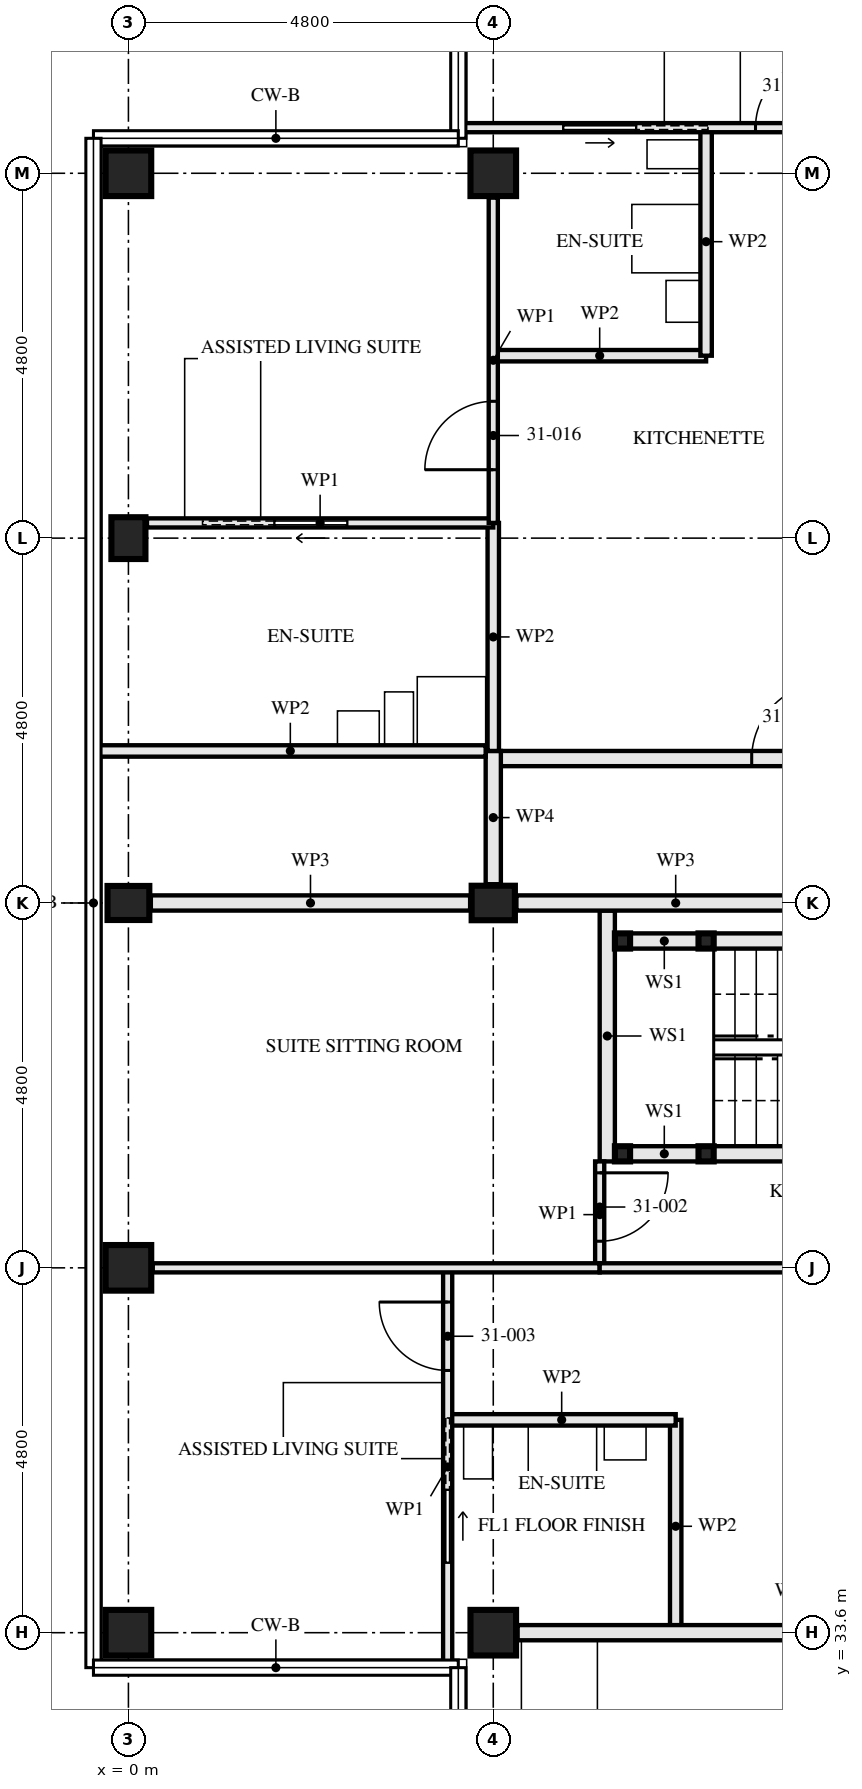
"""IFC4 building model, lengths in metres.
Left out: names, types, materials, properties, quantities, classifications, styles, units other than length and angle.
Written with IfcOpenShell. Run it as: python <this file> out.ifc"""

import sys

from ifc_helpers import new_model, si_unit, direction, frame, frame_2d, origin, origin_2d, place, context, subcontext, project, spatial, rectangle, hollow_rectangle, i_section, extrude, element, fill, save


model = new_model("IFC4")
c1 = context("Model", 3, precision=1e-05, world=origin(), true_north=direction((0.0, 1.0)))
c2 = subcontext(c1, "Body", "Model", "MODEL_VIEW")
j1 = project(units=[si_unit("LENGTHUNIT", "METRE"), si_unit("PLANEANGLEUNIT", "RADIAN")], contexts=[c1])
p1 = place(None, origin())
s1 = spatial("IfcSite", under=j1, at=p1, CompositionType="ELEMENT")
p2 = place(p1, origin())
s2 = spatial("IfcBuilding", under=s1, at=p2, CompositionType="ELEMENT")
p3 = place(p2, frame((0.0, 0.0, 115.5)))
s3 = spatial("IfcBuildingStorey", under=s2, at=p3, CompositionType="ELEMENT", Elevation=115.5)
for number, where, z_axis, x_axis in (
    (1, (0.0, 33.6, 0.0), (0.0, 0.0, 1.0), (0.0, 1.0, 0.0)),
    (2, (0.0, 38.4, 0.0), (0.0, 0.0, 1.0), (1.0, 0.0, 0.0)),
):
    element("IfcColumn", number, at=place(p3, frame(where, z_axis=z_axis, x_axis=x_axis)), inside=s3, PredefinedType="COLUMN", context=c2, shape_type="SweptSolid", body=[
        extrude(hollow_rectangle(XDim=0.6, YDim=0.6, WallThickness=0.08, at=origin_2d()), origin(), (0.0, 0.0, 1.0), 3.5),
    ])
for number, where, z_axis, x_axis in (
    (3, (0.0, 43.2, 0.0), (0.0, 0.0, 1.0), (0.0, 1.0, 0.0)),
    (4, (0.0, 48.0, 0.0), (0.0, 0.0, 1.0), (1.0, 0.0, 0.0)),
):
    element("IfcColumn", number, at=place(p3, frame(where, z_axis=z_axis, x_axis=x_axis)), inside=s3, PredefinedType="COLUMN", context=c2, shape_type="SweptSolid", body=[
        extrude(i_section(OverallWidth=0.448, OverallDepth=0.55, WebThickness=0.072, FlangeThickness=0.115, FilletRadius=0.015, at=origin_2d()), origin(), (0.0, 0.0, 1.0), 3.5),
    ])
p4 = place(p3, frame((0.0, 52.8, 0.0), z_axis=(0.0, 0.0, 1.0), x_axis=(0.0, 1.0, 0.0)))
e5 = element("IfcColumn", 5, at=p4, inside=s3, PredefinedType="COLUMN", context=c2, shape_type="SweptSolid", body=[
    extrude(hollow_rectangle(XDim=0.6, YDim=0.6, WallThickness=0.05, at=origin_2d()), origin(), (0.0, 0.0, 1.0), 3.5),
])
p5 = place(p3, frame((4.8, 33.6, 0.0), z_axis=(0.0, 0.0, 1.0), x_axis=(0.0, 1.0, 0.0)))
e6 = element("IfcColumn", 6, at=p5, inside=s3, PredefinedType="COLUMN", context=c2, shape_type="SweptSolid", body=[
    extrude(hollow_rectangle(XDim=0.6, YDim=0.6, WallThickness=0.08, at=origin_2d()), origin(), (0.0, 0.0, 1.0), 3.5),
])
p6 = place(p3, frame((4.8, 43.2, 0.0), z_axis=(0.0, 0.0, 1.0), x_axis=(0.0, 1.0, 0.0)))
e7 = element("IfcColumn", 7, at=p6, inside=s3, PredefinedType="COLUMN", context=c2, shape_type="SweptSolid", body=[
    extrude(i_section(OverallWidth=0.454, OverallDepth=0.569, WebThickness=0.078, FlangeThickness=0.125, FilletRadius=0.015, at=origin_2d()), origin(), (0.0, 0.0, 1.0), 3.5),
])
p7 = place(p3, frame((4.8, 52.8, 0.0), z_axis=(0.0, 0.0, 1.0), x_axis=(0.0, 1.0, 0.0)))
e8 = element("IfcColumn", 8, at=p7, inside=s3, PredefinedType="COLUMN", context=c2, shape_type="SweptSolid", body=[
    extrude(hollow_rectangle(XDim=0.6, YDim=0.6, WallThickness=0.05, at=origin_2d()), origin(), (0.0, 0.0, 1.0), 3.5),
])
for number, where, z_axis, x_axis in (
    (9, (6.5, 42.7, 0.0), (0.0, 0.0, 1.0), (1.0, 0.0, 0.0)),
    (10, (6.5, 39.9, 0.0), (0.0, 0.0, 1.0), (1.0, 0.0, 0.0)),
    (11, (7.6, 42.7, 0.0), (0.0, 0.0, 1.0), (1.0, 0.0, 0.0)),
    (12, (7.6, 39.9, 0.0), (0.0, 0.0, 1.0), (1.0, 0.0, 0.0)),
):
    element("IfcColumn", number, at=place(p3, frame(where, z_axis=z_axis, x_axis=x_axis)), inside=s3, PredefinedType="COLUMN", context=c2, shape_type="SweptSolid", body=[
        extrude(hollow_rectangle(XDim=0.2, YDim=0.2, WallThickness=0.008, at=origin_2d()), origin(), (0.0, 0.0, 1.0), 3.33),
    ])
p8 = place(p3, frame((6.6, 42.7, 0.0), z_axis=(0.0, 0.0, 1.0), x_axis=(1.0, 0.0, 0.0)))
e13 = element("IfcWall", 13, at=p8, inside=s3, PredefinedType="SOLIDWALL", context=c2, shape_type="SweptSolid", body=[
    extrude(rectangle(XDim=0.9, YDim=0.2, at=frame_2d((0.45, 0.0))), origin(), (0.0, 0.0, 1.0), 2.99),
])
p9 = place(p3, frame((7.7, 42.7, 0.0), z_axis=(0.0, 0.0, 1.0), x_axis=(1.0, 0.0, 0.0)))
e14 = element("IfcWall", 14, at=p9, inside=s3, PredefinedType="SOLIDWALL", context=c2, shape_type="SweptSolid", body=[
    extrude(rectangle(XDim=4.7, YDim=0.2, at=frame_2d((2.35, 0.0))), origin(), (0.0, 0.0, 1.0), 2.99),
])
p10 = place(p3, frame((6.6, 39.9, 0.0), z_axis=(0.0, 0.0, 1.0), x_axis=(1.0, 0.0, 0.0)))
e15 = element("IfcWall", 15, at=p10, inside=s3, PredefinedType="SOLIDWALL", context=c2, shape_type="SweptSolid", body=[
    extrude(rectangle(XDim=0.9, YDim=0.2, at=frame_2d((0.45, 0.0))), origin(), (0.0, 0.0, 1.0), 2.99),
])
p11 = place(p3, frame((7.7, 39.9, 0.0), z_axis=(0.0, 0.0, 1.0), x_axis=(1.0, 0.0, 0.0)))
e16 = element("IfcWall", 16, at=p11, inside=s3, PredefinedType="SOLIDWALL", context=c2, shape_type="SweptSolid", body=[
    extrude(rectangle(XDim=4.7, YDim=0.2, at=frame_2d((2.35, 0.0))), origin(), (0.0, 0.0, 1.0), 2.99),
])
p12 = place(p3, frame((6.3, 43.1, 0.0), z_axis=(0.0, 0.0, 1.0), x_axis=(0.0, -1.0, 0.0)))
e17 = element("IfcWall", 17, at=p12, inside=s3, PredefinedType="SOLIDWALL", context=c2, shape_type="SweptSolid", body=[
    extrude(rectangle(XDim=3.3, YDim=0.2, at=frame_2d((1.65, 0.0))), origin(), (0.0, 0.0, 1.0), 3.33),
])
p13 = place(p3, frame((4.2, 36.4, 0.0), z_axis=(0.0, 0.0, 1.0), x_axis=(1.0, 0.0, 0.0)))
e18 = element("IfcWall", 18, at=p13, inside=s3, PredefinedType="PARTITIONING", context=c2, shape_type="SweptSolid", body=[
    extrude(rectangle(XDim=3.0, YDim=0.15, at=frame_2d((1.5, 0.0))), origin(), (0.0, 0.0, 1.0), 3.33),
])
p14 = place(p3, frame((7.2, 36.4, 0.0), z_axis=(0.0, 0.0, 1.0), x_axis=(0.0, -1.0, 0.0)))
e19 = element("IfcWall", 19, at=p14, inside=s3, PredefinedType="PARTITIONING", context=c2, shape_type="SweptSolid", body=[
    extrude(rectangle(XDim=2.8, YDim=0.15, at=frame_2d((1.4, 0.0))), origin(), (0.0, 0.0, 1.0), 3.33),
])
p15 = place(p3, frame((6.2, 38.4, 0.0), z_axis=(0.0, 0.0, 1.0), x_axis=(1.0, 0.0, 0.0)))
e20 = element("IfcWall", 20, at=p15, inside=s3, PredefinedType="PARTITIONING", context=c2, shape_type="SweptSolid", body=[
    extrude(rectangle(XDim=6.25, YDim=0.12, at=frame_2d((3.125, 0.0))), origin(), (0.0, 0.0, 1.0), 2.55),
])
p16 = place(p15, frame((2.675, 0.0, 0.0)))
e21 = element("IfcOpeningElement", 21, at=p16, cuts=e20, PredefinedType="OPENING", context=c2, shape_type="SweptSolid", body=[
    extrude(rectangle(XDim=0.9, YDim=2.1, at=frame_2d((0.45, 1.05))), frame((0.0, 0.071, 0.0), z_axis=(0.0, -1.0, 0.0), x_axis=(1.0, 0.0, 0.0)), (0.0, 0.0, 1.0), 0.141),
])
p17 = place(p3, frame((6.2, 39.8, 0.0), z_axis=(0.0, 0.0, 1.0), x_axis=(0.0, -1.0, 0.0)))
e22 = element("IfcWall", 22, at=p17, inside=s3, PredefinedType="PARTITIONING", context=c2, shape_type="SweptSolid", body=[
    extrude(rectangle(XDim=1.4, YDim=0.12, at=frame_2d((0.7, 0.0))), origin(), (0.0, 0.0, 1.0), 3.33),
])
p18 = place(p17, frame((0.15, 0.0, 0.0)))
e23 = element("IfcOpeningElement", 23, at=p18, cuts=e22, PredefinedType="OPENING", context=c2, shape_type="SweptSolid", body=[
    extrude(rectangle(XDim=0.9, YDim=2.1, at=frame_2d((0.45, 1.05))), frame((0.0, 0.071, 0.0), z_axis=(0.0, -1.0, 0.0), x_axis=(1.0, 0.0, 0.0)), (0.0, 0.0, 1.0), 0.141),
])
p19 = place(p3, frame((4.2, 38.4, 0.0), z_axis=(0.0, 0.0, 1.0), x_axis=(0.0, -1.0, 0.0)))
e24 = element("IfcWall", 24, at=p19, inside=s3, PredefinedType="PARTITIONING", context=c2, shape_type="SweptSolid", body=[
    extrude(rectangle(XDim=5.24, YDim=0.12, at=frame_2d((2.62, 0.0))), origin(), (0.0, 0.0, 1.0), 2.32),
])
p20 = place(p19, frame((0.45, 0.0, 0.0)))
e25 = element("IfcOpeningElement", 25, at=p20, cuts=e24, PredefinedType="OPENING", context=c2, shape_type="SweptSolid", body=[
    extrude(rectangle(XDim=0.9, YDim=2.1, at=frame_2d((0.45, 1.05))), frame((0.0, 0.071, 0.0), z_axis=(0.0, -1.0, 0.0), x_axis=(1.0, 0.0, 0.0)), (0.0, 0.0, 1.0), 0.141),
])
p21 = place(p19, frame((2.925, 0.0, 0.0)))
e26 = element("IfcOpeningElement", 26, at=p21, cuts=e24, PredefinedType="OPENING", context=c2, shape_type="SweptSolid", body=[
    extrude(rectangle(XDim=0.95, YDim=2.1, at=frame_2d((0.475, 1.05))), frame((0.0, 0.071, 0.0), z_axis=(0.0, -1.0, 0.0), x_axis=(1.0, 0.0, 0.0)), (0.0, 0.0, 1.0), 0.141),
])
p22 = place(p3, frame((0.32, 38.4, 0.0), z_axis=(0.0, 0.0, 1.0), x_axis=(1.0, 0.0, 0.0)))
e27 = element("IfcWall", 27, at=p22, inside=s3, PredefinedType="PARTITIONING", context=c2, shape_type="SweptSolid", body=[
    extrude(rectangle(XDim=5.88, YDim=0.12, at=frame_2d((2.94, 0.0))), origin(), (0.0, 0.0, 1.0), 2.55),
])
p23 = place(p3, frame((5.12, 33.6, 0.0), z_axis=(0.0, 0.0, 1.0), x_axis=(1.0, 0.0, 0.0)))
e28 = element("IfcWall", 28, at=p23, inside=s3, PredefinedType="PARTITIONING", context=c2, shape_type="SweptSolid", body=[
    extrude(rectangle(XDim=7.28, YDim=0.2, at=frame_2d((3.64, 0.0))), origin(), (0.0, 0.0, 1.0), 2.55),
])
p24 = place(p3, frame((7.6, 53.4, 0.0), z_axis=(0.0, 0.0, 1.0), x_axis=(0.0, -1.0, 0.0)))
e29 = element("IfcWall", 29, at=p24, inside=s3, PredefinedType="PARTITIONING", context=c2, shape_type="SweptSolid", body=[
    extrude(rectangle(XDim=3.0, YDim=0.15, at=frame_2d((1.5, 0.0))), origin(), (0.0, 0.0, 1.0), 2.55),
])
p25 = place(p3, frame((7.6, 50.4, 0.0), z_axis=(0.0, 0.0, 1.0), x_axis=(-1.0, 0.0, 0.0)))
e30 = element("IfcWall", 30, at=p25, inside=s3, PredefinedType="PARTITIONING", context=c2, shape_type="SweptSolid", body=[
    extrude(rectangle(XDim=2.8, YDim=0.15, at=frame_2d((1.4, 0.0))), origin(), (0.0, 0.0, 1.0), 3.33),
])
p26 = place(p3, frame((4.8, 48.2, 0.0), z_axis=(0.0, 0.0, 1.0), x_axis=(0.0, -1.0, 0.0)))
e31 = element("IfcWall", 31, at=p26, inside=s3, PredefinedType="PARTITIONING", context=c2, shape_type="SweptSolid", body=[
    extrude(rectangle(XDim=3.0, YDim=0.15, at=frame_2d((1.5, 0.0))), origin(), (0.0, 0.0, 1.0), 2.55),
])
p27 = place(p3, frame((9.6, 53.4, 0.0), z_axis=(0.0, 0.0, 1.0), x_axis=(-1.0, 0.0, 0.0)))
e32 = element("IfcWall", 32, at=p27, inside=s3, PredefinedType="PARTITIONING", context=c2, shape_type="SweptSolid", body=[
    extrude(rectangle(XDim=5.24, YDim=0.12, at=frame_2d((2.62, 0.0))), origin(), (0.0, 0.0, 1.0), 2.32),
])
p28 = place(p27, frame((0.45, 0.0, 0.0)))
e33 = element("IfcOpeningElement", 33, at=p28, cuts=e32, PredefinedType="OPENING", context=c2, shape_type="SweptSolid", body=[
    extrude(rectangle(XDim=0.9, YDim=2.1, at=frame_2d((0.45, 1.05))), frame((0.0, 0.071, 0.0), z_axis=(0.0, -1.0, 0.0), x_axis=(1.0, 0.0, 0.0)), (0.0, 0.0, 1.0), 0.141),
])
p29 = place(p27, frame((2.925, 0.0, 0.0)))
e34 = element("IfcOpeningElement", 34, at=p29, cuts=e32, PredefinedType="OPENING", context=c2, shape_type="SweptSolid", body=[
    extrude(rectangle(XDim=0.95, YDim=2.1, at=frame_2d((0.475, 1.05))), frame((0.0, 0.071, 0.0), z_axis=(0.0, -1.0, 0.0), x_axis=(1.0, 0.0, 0.0)), (0.0, 0.0, 1.0), 0.141),
])
p30 = place(p3, frame((4.8, 48.2, 0.0), z_axis=(0.0, 0.0, 1.0), x_axis=(-1.0, 0.0, 0.0)))
e35 = element("IfcWall", 35, at=p30, inside=s3, PredefinedType="PARTITIONING", context=c2, shape_type="SweptSolid", body=[
    extrude(rectangle(XDim=4.556, YDim=0.12, at=frame_2d((2.278, 0.0))), origin(), (0.0, 0.0, 1.0), 3.33),
])
p31 = place(p30, frame((1.925, 0.0, 0.0)))
e36 = element("IfcOpeningElement", 36, at=p31, cuts=e35, PredefinedType="OPENING", context=c2, shape_type="SweptSolid", body=[
    extrude(rectangle(XDim=0.95, YDim=2.1, at=frame_2d((0.475, 1.05))), frame((0.0, 0.071, 0.0), z_axis=(0.0, -1.0, 0.0), x_axis=(1.0, 0.0, 0.0)), (0.0, 0.0, 1.0), 0.141),
])
p32 = place(p3, frame((4.8, 52.48, 0.0), z_axis=(0.0, 0.0, 1.0), x_axis=(0.0, -1.0, 0.0)))
e37 = element("IfcWall", 37, at=p32, inside=s3, PredefinedType="PARTITIONING", context=c2, shape_type="SweptSolid", body=[
    extrude(rectangle(XDim=4.28, YDim=0.12, at=frame_2d((2.14, 0.0))), origin(), (0.0, 0.0, 1.0), 3.33),
])
p33 = place(p32, frame((2.68, 0.0, 0.0)))
e38 = element("IfcOpeningElement", 38, at=p33, cuts=e37, PredefinedType="OPENING", context=c2, shape_type="SweptSolid", body=[
    extrude(rectangle(XDim=0.9, YDim=2.1, at=frame_2d((0.45, 1.05))), frame((0.0, 0.071, 0.0), z_axis=(0.0, -1.0, 0.0), x_axis=(1.0, 0.0, 0.0)), (0.0, 0.0, 1.0), 0.141),
])
p34 = place(p3, frame((14.4, 45.1, 0.0), z_axis=(0.0, 0.0, 1.0), x_axis=(-1.0, 0.0, 0.0)))
e39 = element("IfcWall", 39, at=p34, inside=s3, PredefinedType="PARTITIONING", context=c2, shape_type="SweptSolid", body=[
    extrude(rectangle(XDim=9.6, YDim=0.2, at=frame_2d((4.8, 0.0))), origin(), (0.0, 0.0, 1.0), 3.33),
])
p35 = place(p34, frame((0.4, 0.0, 0.0)))
e40 = element("IfcOpeningElement", 40, at=p35, cuts=e39, PredefinedType="OPENING", context=c2, shape_type="SweptSolid", body=[
    extrude(rectangle(XDim=1.0, YDim=2.1, at=frame_2d((0.5, 1.05))), frame((0.0, 0.111, 0.0), z_axis=(0.0, -1.0, 0.0), x_axis=(1.0, 0.0, 0.0)), (0.0, 0.0, 1.0), 0.221),
])
p36 = place(p34, frame((5.2, 0.0, 0.0)))
e41 = element("IfcOpeningElement", 41, at=p36, cuts=e39, PredefinedType="OPENING", context=c2, shape_type="SweptSolid", body=[
    extrude(rectangle(XDim=1.0, YDim=2.1, at=frame_2d((0.5, 1.05))), frame((0.0, 0.111, 0.0), z_axis=(0.0, -1.0, 0.0), x_axis=(1.0, 0.0, 0.0)), (0.0, 0.0, 1.0), 0.221),
])
p37 = place(p3, frame((4.8, 45.2, 0.0), z_axis=(0.0, 0.0, 1.0), x_axis=(0.0, -1.0, 0.0)))
e42 = element("IfcWall", 42, at=p37, inside=s3, PredefinedType="PARTITIONING", context=c2, shape_type="SweptSolid", body=[
    extrude(rectangle(XDim=1.753, YDim=0.2, at=frame_2d((0.876, 0.0))), origin(), (0.0, 0.0, 1.0), 3.33),
])
p38 = place(p3, frame((9.295, 43.2, 0.0), z_axis=(0.0, 0.0, 1.0), x_axis=(-1.0, 0.0, 0.0)))
e43 = element("IfcWall", 43, at=p38, inside=s3, PredefinedType="PARTITIONING", context=c2, shape_type="SweptSolid", body=[
    extrude(rectangle(XDim=4.191, YDim=0.2, at=frame_2d((2.095, 0.0))), origin(), (0.0, 0.0, 1.0), 2.32),
])
p39 = place(p3, frame((4.496, 43.2, 0.0), z_axis=(0.0, 0.0, 1.0), x_axis=(-1.0, 0.0, 0.0)))
e44 = element("IfcWall", 44, at=p39, inside=s3, PredefinedType="PARTITIONING", context=c2, shape_type="SweptSolid", body=[
    extrude(rectangle(XDim=4.201, YDim=0.2, at=frame_2d((2.1, 0.0))), origin(), (0.0, 0.0, 1.0), 2.32),
])
p40 = place(p3, frame((4.7, 45.2, 0.0), z_axis=(0.0, 0.0, 1.0), x_axis=(-1.0, 0.0, 0.0)))
e45 = element("IfcWall", 45, at=p40, inside=s3, PredefinedType="PARTITIONING", context=c2, shape_type="SweptSolid", body=[
    extrude(rectangle(XDim=5.14, YDim=0.15, at=frame_2d((2.57, 0.0))), origin(), (0.0, 0.0, 1.0), 2.32),
])
p41 = place(p18, origin())
e46 = element("IfcDoor", 46, at=p41, inside=s3, OperationType="SINGLE_SWING_RIGHT", PredefinedType="DOOR", context=c2, shape_type="SweptSolid", body=[
    extrude(rectangle(XDim=0.9, YDim=2.1, at=frame_2d((0.45, 1.05))), frame((0.0, 0.022, 0.0), z_axis=(0.0, -1.0, 0.0), x_axis=(1.0, 0.0, 0.0)), (0.0, 0.0, 1.0), 0.044),
])
fill(e23, e46)
p42 = place(p20, frame((0.9, 0.0, 0.0), z_axis=(0.0, 0.0, 1.0), x_axis=(-1.0, 0.0, 0.0)))
e47 = element("IfcDoor", 47, at=p42, inside=s3, OperationType="SINGLE_SWING_LEFT", PredefinedType="DOOR", context=c2, shape_type="SweptSolid", body=[
    extrude(rectangle(XDim=0.9, YDim=2.1, at=frame_2d((0.45, 1.05))), frame((0.0, 0.022, 0.0), z_axis=(0.0, -1.0, 0.0), x_axis=(1.0, 0.0, 0.0)), (0.0, 0.0, 1.0), 0.044),
])
fill(e25, e47)
p43 = place(p21, origin())
e48 = element("IfcDoor", 48, at=p43, inside=s3, OperationType="SLIDING_TO_RIGHT", PredefinedType="DOOR", context=c2, shape_type="SweptSolid", body=[
    extrude(rectangle(XDim=0.95, YDim=2.1, at=frame_2d((0.475, 1.05))), frame((0.0, 0.022, 0.0), z_axis=(0.0, -1.0, 0.0), x_axis=(1.0, 0.0, 0.0)), (0.0, 0.0, 1.0), 0.044),
])
fill(e26, e48)
p44 = place(p28, frame((0.9, 0.0, 0.0), z_axis=(0.0, 0.0, 1.0), x_axis=(-1.0, 0.0, 0.0)))
e49 = element("IfcDoor", 49, at=p44, inside=s3, OperationType="SINGLE_SWING_LEFT", PredefinedType="DOOR", context=c2, shape_type="SweptSolid", body=[
    extrude(rectangle(XDim=0.9, YDim=2.1, at=frame_2d((0.45, 1.05))), frame((0.0, 0.022, 0.0), z_axis=(0.0, -1.0, 0.0), x_axis=(1.0, 0.0, 0.0)), (0.0, 0.0, 1.0), 0.044),
])
fill(e33, e49)
p45 = place(p29, origin())
e50 = element("IfcDoor", 50, at=p45, inside=s3, OperationType="SLIDING_TO_RIGHT", PredefinedType="DOOR", context=c2, shape_type="SweptSolid", body=[
    extrude(rectangle(XDim=0.95, YDim=2.1, at=frame_2d((0.475, 1.05))), frame((0.0, 0.022, 0.0), z_axis=(0.0, -1.0, 0.0), x_axis=(1.0, 0.0, 0.0)), (0.0, 0.0, 1.0), 0.044),
])
fill(e34, e50)
p46 = place(p31, origin())
e51 = element("IfcDoor", 51, at=p46, inside=s3, OperationType="SLIDING_TO_LEFT", PredefinedType="DOOR", context=c2, shape_type="SweptSolid", body=[
    extrude(rectangle(XDim=0.95, YDim=2.1, at=frame_2d((0.475, 1.05))), frame((0.0, 0.022, 0.0), z_axis=(0.0, -1.0, 0.0), x_axis=(1.0, 0.0, 0.0)), (0.0, 0.0, 1.0), 0.044),
])
fill(e36, e51)
p47 = place(p33, frame((0.9, 0.0, 0.0), z_axis=(0.0, 0.0, 1.0), x_axis=(-1.0, 0.0, 0.0)))
e52 = element("IfcDoor", 52, at=p47, inside=s3, OperationType="SINGLE_SWING_RIGHT", PredefinedType="DOOR", context=c2, shape_type="SweptSolid", body=[
    extrude(rectangle(XDim=0.9, YDim=2.1, at=frame_2d((0.45, 1.05))), frame((0.0, 0.022, 0.0), z_axis=(0.0, -1.0, 0.0), x_axis=(1.0, 0.0, 0.0)), (0.0, 0.0, 1.0), 0.044),
])
fill(e38, e52)
p48 = place(p36, frame((1.0, 0.0, 0.0), z_axis=(0.0, 0.0, 1.0), x_axis=(-1.0, 0.0, 0.0)))
e53 = element("IfcDoor", 53, at=p48, inside=s3, OperationType="SINGLE_SWING_LEFT", PredefinedType="DOOR", context=c2, shape_type="SweptSolid", body=[
    extrude(rectangle(XDim=1.0, YDim=2.1, at=frame_2d((0.5, 1.05))), frame((0.0, 0.027, 0.0), z_axis=(0.0, -1.0, 0.0), x_axis=(1.0, 0.0, 0.0)), (0.0, 0.0, 1.0), 0.054),
])
fill(e41, e53)
save(model, sys.argv[1])
